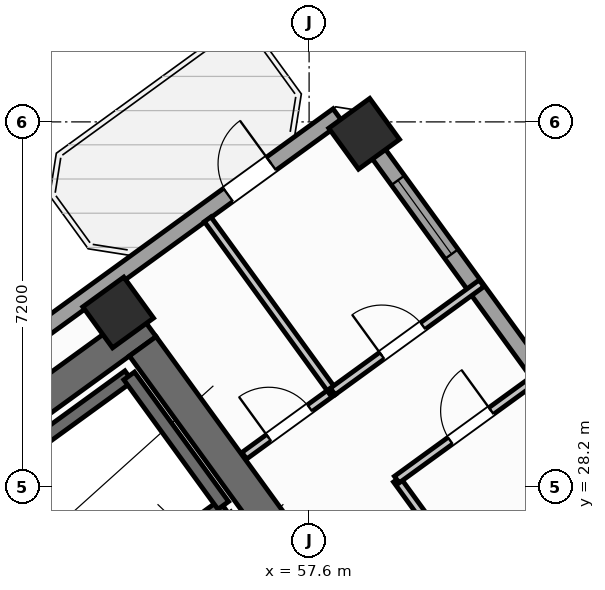
"""IFC4 building model, lengths in metres.
Left out: names, types, materials, properties, quantities, classifications, styles, units other than length and angle.
Written with IfcOpenShell. Run it as: python <this file> out.ifc"""

import sys

from ifc_helpers import new_model, si_unit, direction, frame, frame_2d, origin, origin_2d, place, context, subcontext, project, spatial, rectangle, hollow_rectangle, extrude, source, transform, mapped, element, fill, save


model = new_model("IFC4")
c1 = context("Model", 3, precision=1e-05, world=origin(), true_north=direction((0.0, 1.0)))
c2 = subcontext(c1, "Body", "Model", "MODEL_VIEW")
j1 = project(units=[si_unit("LENGTHUNIT", "METRE"), si_unit("PLANEANGLEUNIT", "RADIAN")], contexts=[c1])
p1 = place(None, origin())
s1 = spatial("IfcSite", under=j1, at=p1, CompositionType="ELEMENT")
p2 = place(p1, origin())
s2 = spatial("IfcBuilding", under=s1, at=p2, CompositionType="ELEMENT")
p3 = place(p2, frame((0.0, 0.0, 34.8)))
s3 = spatial("IfcBuildingStorey", under=s2, at=p3, CompositionType="ELEMENT", Elevation=34.8)
p4 = place(p3, frame((44.325, 24.113, 0.0), z_axis=(0.0, 0.0, 1.0), x_axis=(0.809012664862, 0.58779121131, 0.0)))
e1 = element("IfcWall", 1, at=p4, inside=s3, PredefinedType="SHEAR", context=c2, shape_type="SweptSolid", body=[
    extrude(rectangle(XDim=12.44, YDim=0.65, at=frame_2d((6.22, 0.0))), origin(), (0.0, 0.0, 1.0), 3.35),
])
p5 = place(p3, frame((58.064, 25.813, 0.0), z_axis=(0.0, 0.0, 1.0), x_axis=(-0.58777996584, 0.809020835181, 0.0)))
e2 = element("IfcWall", 2, at=p5, inside=s3, PredefinedType="SHEAR", context=c2, shape_type="SweptSolid", body=[
    extrude(rectangle(XDim=6.375, YDim=0.65, at=frame_2d((3.188, 0.0))), origin(), (0.0, 0.0, 1.0), 3.35),
])
m1 = source(origin(), c2, "Body", "SweptSolid", [
    extrude(hollow_rectangle(XDim=1.0, YDim=1.0, WallThickness=0.04, at=origin_2d()), origin(), (0.0, 0.0, 1.0), 3.6),
])
for number, where, z_axis, x_axis in (
    (3, (53.832, 31.638, 0.0), (0.0, 0.0, 1.0), (0.809, 0.588, 0.0)),
    (4, (58.686, 35.165, 0.0), (0.0, 0.0, 1.0), (0.809, 0.588, 0.0)),
):
    element("IfcColumn", number, at=place(p3, frame(where, z_axis=z_axis, x_axis=x_axis)), inside=s3, PredefinedType="COLUMN", context=c2, shape_type="MappedRepresentation", body=[
        mapped(m1, transform((0.0, 0.0, 0.0), scale=1.0)),
    ])
p6 = place(p3, frame((43.938, 25.192, 0.0), z_axis=(0.0, 0.0, 1.0), x_axis=(0.809016324578, 0.587786174187, 0.0)))
e5 = element("IfcWall", 5, at=p6, inside=s3, PredefinedType="STANDARD", context=c2, shape_type="SweptSolid", body=[
    extrude(rectangle(XDim=17.587, YDim=0.32, at=frame_2d((8.794, 0.0))), origin(), (0.0, 0.0, 1.0), 3.35),
])
p7 = place(p6, frame((14.914, 0.0, 0.0)))
e6 = element("IfcOpeningElement", 6, at=p7, cuts=e5, PredefinedType="OPENING", context=c2, shape_type="SweptSolid", body=[
    extrude(rectangle(XDim=1.05, YDim=2.15, at=frame_2d((0.525, 1.075))), frame((0.0, 0.17, 0.0), z_axis=(0.0, -1.0, 0.0), x_axis=(1.0, 0.0, 0.0)), (0.0, 0.0, 1.0), 0.34),
])
p8 = place(p6, frame((2.169, 0.0, 0.8)))
e7 = element("IfcOpeningElement", 7, at=p8, cuts=e5, PredefinedType="OPENING", context=c2, shape_type="SweptSolid", body=[
    extrude(rectangle(XDim=2.1, YDim=1.55, at=frame_2d((1.05, 0.775))), frame((0.0, 0.17, 0.0), z_axis=(0.0, -1.0, 0.0), x_axis=(1.0, 0.0, 0.0)), (0.0, 0.0, 1.0), 0.34),
])
p9 = place(p6, frame((7.319, 0.0, 0.8)))
e8 = element("IfcOpeningElement", 8, at=p9, cuts=e5, PredefinedType="OPENING", context=c2, shape_type="SweptSolid", body=[
    extrude(rectangle(XDim=2.1, YDim=1.55, at=frame_2d((1.05, 0.775))), frame((0.0, 0.17, 0.0), z_axis=(0.0, -1.0, 0.0), x_axis=(1.0, 0.0, 0.0)), (0.0, 0.0, 1.0), 0.34),
])
p10 = place(p3, frame((58.455, 35.484, 0.0), z_axis=(0.0, 0.0, 1.0), x_axis=(0.587783625747, -0.809018176127, 0.0)))
e9 = element("IfcWall", 9, at=p10, inside=s3, PredefinedType="STANDARD", context=c2, shape_type="SweptSolid", body=[
    extrude(rectangle(XDim=21.587, YDim=0.32, at=frame_2d((10.794, 0.0))), origin(), (0.0, 0.0, 1.0), 2.725),
])
p11 = place(p10, frame((1.529, 0.0, 0.85)))
e10 = element("IfcOpeningElement", 10, at=p11, cuts=e9, PredefinedType="OPENING", context=c2, shape_type="SweptSolid", body=[
    extrude(rectangle(XDim=1.8, YDim=1.5, at=frame_2d((0.9, 0.75))), frame((0.0, 0.17, 0.0), z_axis=(0.0, -1.0, 0.0), x_axis=(1.0, 0.0, 0.0)), (0.0, 0.0, 1.0), 0.34),
])
p12 = place(p10, frame((10.444, 0.0, 0.85)))
e11 = element("IfcOpeningElement", 11, at=p12, cuts=e9, PredefinedType="OPENING", context=c2, shape_type="SweptSolid", body=[
    extrude(rectangle(XDim=1.8, YDim=1.5, at=frame_2d((0.9, 0.75))), frame((0.0, 0.17, 0.0), z_axis=(0.0, -1.0, 0.0), x_axis=(1.0, 0.0, 0.0)), (0.0, 0.0, 1.0), 0.34),
])
p13 = place(p10, frame((17.595, 0.0, 0.85)))
e12 = element("IfcOpeningElement", 12, at=p13, cuts=e9, PredefinedType="OPENING", context=c2, shape_type="SweptSolid", body=[
    extrude(rectangle(XDim=1.5, YDim=1.5, at=frame_2d((0.75, 0.75))), frame((0.0, 0.17, 0.0), z_axis=(0.0, -1.0, 0.0), x_axis=(1.0, 0.0, 0.0)), (0.0, 0.0, 1.0), 0.34),
])
p14 = place(p3, frame((48.006, 25.996, 0.0), z_axis=(0.0, 0.0, 1.0), x_axis=(0.80901903764, 0.587782439969, 0.0)))
e13 = element("IfcWall", 13, at=p14, inside=s3, PredefinedType="SHEAR", context=c2, shape_type="SweptSolid", body=[
    extrude(rectangle(XDim=7.46, YDim=0.26, at=frame_2d((3.73, 0.0))), origin(), (0.0, 0.0, 1.0), 3.35),
])
p15 = place(p3, frame((49.863, 23.44, 0.0), z_axis=(0.0, 0.0, 1.0), x_axis=(0.809003474932, 0.587803859759, 0.0)))
e14 = element("IfcWall", 14, at=p15, inside=s3, PredefinedType="SHEAR", context=c2, shape_type="SweptSolid", body=[
    extrude(rectangle(XDim=7.46, YDim=0.26, at=frame_2d((3.73, 0.0))), origin(), (0.0, 0.0, 1.0), 3.35),
])
p16 = place(p15, frame((0.36, 0.0, 0.0)))
e15 = element("IfcOpeningElement", 15, at=p16, cuts=e14, PredefinedType="OPENING", context=c2, shape_type="SweptSolid", body=[
    extrude(rectangle(XDim=0.86, YDim=2.05, at=frame_2d((0.43, 1.025))), frame((0.0, 0.14, 0.0), z_axis=(0.0, -1.0, 0.0), x_axis=(1.0, 0.0, 0.0)), (0.0, 0.0, 1.0), 0.28),
])
p17 = place(p3, frame((55.906, 27.831, 0.0), z_axis=(0.0, 0.0, 1.0), x_axis=(-0.587804123638, 0.809003283204, 0.0)))
e16 = element("IfcWall", 16, at=p17, inside=s3, PredefinedType="SHEAR", context=c2, shape_type="SweptSolid", body=[
    extrude(rectangle(XDim=3.16, YDim=0.26, at=frame_2d((1.58, 0.0))), origin(), (0.0, 0.0, 1.0), 3.35),
])
p18 = place(p3, frame((56.321, 28.812, 0.0), z_axis=(0.0, 0.0, 1.0), x_axis=(0.809029482429, 0.587768063577, 0.0)))
e17 = element("IfcWall", 17, at=p18, inside=s3, PredefinedType="PARTITIONING", context=c2, shape_type="SweptSolid", body=[
    extrude(rectangle(XDim=2.158, YDim=0.16, at=frame_2d((1.079, 0.0))), origin(), (0.0, 0.0, 1.0), 3.34),
])
p19 = place(p18, frame((0.598, 0.0, 0.0)))
e18 = element("IfcOpeningElement", 18, at=p19, cuts=e17, PredefinedType="OPENING", context=c2, shape_type="SweptSolid", body=[
    extrude(rectangle(XDim=1.0, YDim=2.1, at=frame_2d((0.5, 1.05))), frame((0.0, 0.09, 0.0), z_axis=(0.0, -1.0, 0.0), x_axis=(1.0, 0.0, 0.0)), (0.0, 0.0, 1.0), 0.18),
])
p20 = place(p3, frame((68.353, 15.922, 0.0), z_axis=(0.0, 0.0, 1.0), x_axis=(-0.587782002009, 0.809019355834, 0.0)))
e19 = element("IfcWall", 19, at=p20, inside=s3, PredefinedType="PARTITIONING", context=c2, shape_type="SweptSolid", body=[
    extrude(rectangle(XDim=15.35, YDim=0.16, at=frame_2d((7.675, 0.0))), origin(), (0.0, 0.0, 1.0), 3.34),
])
p21 = place(p3, frame((58.067, 30.08, 0.0), z_axis=(0.0, 0.0, 1.0), x_axis=(-0.587812175236, 0.808997433027, 0.0)))
e20 = element("IfcWall", 20, at=p21, inside=s3, PredefinedType="PARTITIONING", context=c2, shape_type="SweptSolid", body=[
    extrude(rectangle(XDim=4.2, YDim=0.16, at=frame_2d((2.1, 0.0))), origin(), (0.0, 0.0, 1.0), 3.34),
])
p22 = place(p3, frame((59.331, 28.341, 0.0), z_axis=(0.0, 0.0, 1.0), x_axis=(0.809003564202, 0.587803736896, 0.0)))
e21 = element("IfcWall", 21, at=p22, inside=s3, PredefinedType="PARTITIONING", context=c2, shape_type="SweptSolid", body=[
    extrude(rectangle(XDim=3.63, YDim=0.16, at=frame_2d((1.815, 0.0))), origin(), (0.0, 0.0, 1.0), 3.34),
])
p23 = place(p22, frame((1.305, 0.0, 0.0)))
e22 = element("IfcOpeningElement", 22, at=p23, cuts=e21, PredefinedType="OPENING", context=c2, shape_type="SweptSolid", body=[
    extrude(rectangle(XDim=1.0, YDim=2.1, at=frame_2d((0.5, 1.05))), frame((0.0, 0.09, 0.0), z_axis=(0.0, -1.0, 0.0), x_axis=(1.0, 0.0, 0.0)), (0.0, 0.0, 1.0), 0.18),
])
p24 = place(p3, frame((58.067, 30.08, 0.0), z_axis=(0.0, 0.0, 1.0), x_axis=(0.809012309495, 0.587791700422, 0.0)))
e23 = element("IfcWall", 23, at=p24, inside=s3, PredefinedType="PARTITIONING", context=c2, shape_type="SweptSolid", body=[
    extrude(rectangle(XDim=3.63, YDim=0.16, at=frame_2d((1.815, 0.0))), origin(), (0.0, 0.0, 1.0), 3.34),
])
p25 = place(p24, frame((1.2, 0.0, 0.0)))
e24 = element("IfcOpeningElement", 24, at=p25, cuts=e23, PredefinedType="OPENING", context=c2, shape_type="SweptSolid", body=[
    extrude(rectangle(XDim=1.0, YDim=2.1, at=frame_2d((0.5, 1.05))), frame((0.0, 0.09, 0.0), z_axis=(0.0, -1.0, 0.0), x_axis=(1.0, 0.0, 0.0)), (0.0, 0.0, 1.0), 0.18),
])
m2 = source(origin(), c2, "Body", "SweptSolid", [
    extrude(rectangle(XDim=1.05, YDim=2.15, at=frame_2d((0.525, 1.075))), frame((0.0, 0.025, 0.0), z_axis=(0.0, -1.0, 0.0), x_axis=(1.0, 0.0, 0.0)), (0.0, 0.0, 1.0), 0.05),
])
p26 = place(p7, origin())
e25 = element("IfcDoor", 25, at=p26, inside=s3, OperationType="SINGLE_SWING_RIGHT", PredefinedType="DOOR", context=c2, shape_type="MappedRepresentation", body=[
    mapped(m2, transform((0.0, 0.0, 0.0), scale=1.0)),
])
fill(e6, e25)
m3 = source(origin(), c2, "Body", "SweptSolid", [
    extrude(rectangle(XDim=1.8, YDim=1.5, at=frame_2d((0.9, 0.75))), frame((0.0, 0.03, 0.0), z_axis=(0.0, -1.0, 0.0), x_axis=(1.0, 0.0, 0.0)), (0.0, 0.0, 1.0), 0.06),
])
p27 = place(p11, origin())
e26 = element("IfcWindow", 26, at=p27, inside=s3, PartitioningType="SINGLE_PANEL", PredefinedType="WINDOW", context=c2, shape_type="MappedRepresentation", body=[
    mapped(m3, transform((0.0, 0.0, 0.0), scale=1.0)),
])
fill(e10, e26)
m4 = source(origin(), c2, "Body", "SweptSolid", [
    extrude(rectangle(XDim=1.0, YDim=2.1, at=frame_2d((0.5, 1.05))), frame((0.0, 0.025, 0.0), z_axis=(0.0, -1.0, 0.0), x_axis=(1.0, 0.0, 0.0)), (0.0, 0.0, 1.0), 0.05),
])
p28 = place(p19, origin())
e27 = element("IfcDoor", 27, at=p28, inside=s3, OperationType="SINGLE_SWING_LEFT", PredefinedType="DOOR", context=c2, shape_type="MappedRepresentation", body=[
    mapped(m4, transform((0.0, 0.0, 0.0), scale=1.0)),
])
fill(e18, e27)
p29 = place(p25, origin())
e28 = element("IfcDoor", 28, at=p29, inside=s3, OperationType="SINGLE_SWING_LEFT", PredefinedType="DOOR", context=c2, shape_type="MappedRepresentation", body=[
    mapped(m4, transform((0.0, 0.0, 0.0), scale=1.0)),
])
fill(e24, e28)
p30 = place(p23, origin())
e29 = element("IfcDoor", 29, at=p30, inside=s3, OperationType="SINGLE_SWING_RIGHT", PredefinedType="DOOR", context=c2, shape_type="MappedRepresentation", body=[
    mapped(m4, transform((0.0, 0.0, 0.0), scale=1.0)),
])
fill(e22, e29)
save(model, sys.argv[1])
